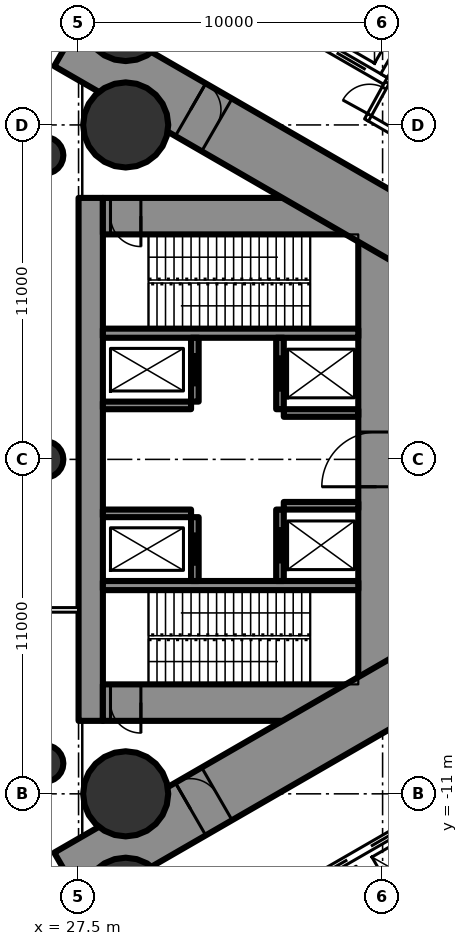
"""IFC4 building model, lengths in metres.
Left out: names, types, materials, properties, quantities, classifications, styles, units other than length and angle.
Written with IfcOpenShell. Run it as: python <this file> out.ifc"""

import sys

from ifc_helpers import new_model, si_unit, direction, frame, frame_2d, origin, origin_2d, place, context, subcontext, project, spatial, rectangle, circle, hollow_circle, extrude, element, fill, save


model = new_model("IFC4")
c1 = context("Model", 3, precision=1e-05, world=origin(), true_north=direction((0.0, 1.0)))
c2 = subcontext(c1, "Body", "Model", "MODEL_VIEW")
j1 = project(units=[si_unit("LENGTHUNIT", "METRE"), si_unit("PLANEANGLEUNIT", "RADIAN")], contexts=[c1])
p1 = place(None, origin())
s1 = spatial("IfcSite", under=j1, at=p1, CompositionType="ELEMENT")
p2 = place(p1, origin())
s2 = spatial("IfcBuilding", under=s1, at=p2, CompositionType="ELEMENT")
p3 = place(p2, origin())
s3 = spatial("IfcBuildingStorey", under=s2, at=p3, CompositionType="ELEMENT", Elevation=0.0)
for number, where, z_axis, x_axis in (
    (1, (29.05, 11.0, 0.0), (0.0, 0.0, 1.0), (1.0, 0.0, 0.0)),
    (2, (29.05, -11.0, 0.0), (0.0, 0.0, 1.0), (1.0, 0.0, 0.0)),
    (3, (29.05, -14.5, 0.0), (0.0, 0.0, 1.0), (1.0, 0.0, 0.0)),
    (4, (29.05, 14.5, 0.0), (0.0, 0.0, 1.0), (1.0, 0.0, 0.0)),
):
    element("IfcColumn", number, at=place(p3, frame(where, z_axis=z_axis, x_axis=x_axis)), inside=s3, PredefinedType="COLUMN", context=c2, shape_type="SweptSolid", body=[
        extrude(hollow_circle(Radius=1.4, WallThickness=0.12, at=origin_2d()), origin(), (0.0, 0.0, 1.0), 7.2),
    ])
p4 = place(p3, frame((27.9, -8.6, 0.0), z_axis=(0.0, 0.0, 1.0), x_axis=(0.0, 1.0, 0.0)))
e5 = element("IfcWall", 5, at=p4, inside=s3, PredefinedType="SHEAR", context=c2, shape_type="SweptSolid", body=[
    extrude(rectangle(XDim=17.2, YDim=0.8, at=frame_2d((8.6, 0.0))), origin(), (0.0, 0.0, 1.0), 7.2),
])
p5 = place(p3, frame((37.3, -8.6, 0.0), z_axis=(0.0, 0.0, 1.0), x_axis=(0.0, 1.0, 0.0)))
e6 = element("IfcWall", 6, at=p5, inside=s3, PredefinedType="SHEAR", context=c2, shape_type="SweptSolid", body=[
    extrude(rectangle(XDim=17.2, YDim=1.2, at=frame_2d((8.6, 0.0))), origin(), (0.0, 0.0, 1.0), 7.2),
])
p6 = place(p5, frame((7.7, 0.0, 0.0)))
e7 = element("IfcOpeningElement", 7, at=p6, cuts=e6, PredefinedType="OPENING", context=c2, shape_type="SweptSolid", body=[
    extrude(rectangle(XDim=1.8, YDim=2.2, at=frame_2d((0.9, 1.1))), frame((0.0, 0.61, 0.0), z_axis=(0.0, -1.0, 0.0), x_axis=(1.0, 0.0, 0.0)), (0.0, 0.0, 1.0), 1.22),
])
p7 = place(p3, frame((28.3, -8.0, 0.0), z_axis=(0.0, 0.0, 1.0), x_axis=(1.0, 0.0, 0.0)))
e8 = element("IfcWall", 8, at=p7, inside=s3, PredefinedType="SHEAR", context=c2, shape_type="SweptSolid", body=[
    extrude(rectangle(XDim=8.4, YDim=1.2, at=frame_2d((4.2, 0.0))), origin(), (0.0, 0.0, 1.0), 7.2),
])
p8 = place(p7, frame((0.25, 0.0, 0.0)))
e9 = element("IfcOpeningElement", 9, at=p8, cuts=e8, PredefinedType="OPENING", context=c2, shape_type="SweptSolid", body=[
    extrude(rectangle(XDim=1.0, YDim=2.2, at=frame_2d((0.5, 1.1))), frame((0.0, 0.61, 0.0), z_axis=(0.0, -1.0, 0.0), x_axis=(1.0, 0.0, 0.0)), (0.0, 0.0, 1.0), 1.22),
])
p9 = place(p3, frame((28.3, 8.0, 0.0), z_axis=(0.0, 0.0, 1.0), x_axis=(1.0, 0.0, 0.0)))
e10 = element("IfcWall", 10, at=p9, inside=s3, PredefinedType="SHEAR", context=c2, shape_type="SweptSolid", body=[
    extrude(rectangle(XDim=8.4, YDim=1.2, at=frame_2d((4.2, 0.0))), origin(), (0.0, 0.0, 1.0), 7.2),
])
p10 = place(p9, frame((0.25, 0.0, 0.0)))
e11 = element("IfcOpeningElement", 11, at=p10, cuts=e10, PredefinedType="OPENING", context=c2, shape_type="SweptSolid", body=[
    extrude(rectangle(XDim=1.0, YDim=2.2, at=frame_2d((0.5, 1.1))), frame((0.0, 0.61, 0.0), z_axis=(0.0, -1.0, 0.0), x_axis=(1.0, 0.0, 0.0)), (0.0, 0.0, 1.0), 1.22),
])
for number, where, z_axis, x_axis in (
    (12, (28.3, -4.15, 0.0), (0.0, 0.0, 1.0), (1.0, 0.0, 0.0)),
    (13, (28.3, 4.15, 0.0), (0.0, 0.0, 1.0), (1.0, 0.0, 0.0)),
):
    element("IfcWall", number, at=place(p3, frame(where, z_axis=z_axis, x_axis=x_axis)), inside=s3, PredefinedType="SHEAR", context=c2, shape_type="SweptSolid", body=[
        extrude(rectangle(XDim=8.4, YDim=0.3, at=frame_2d((4.2, 0.0))), origin(), (0.0, 0.0, 1.0), 7.2),
    ])
p11 = place(p3, frame((31.325, -4.0, 0.0), z_axis=(0.0, 0.0, 1.0), x_axis=(0.0, 1.0, 0.0)))
e14 = element("IfcWall", 14, at=p11, inside=s3, PredefinedType="SHEAR", context=c2, shape_type="SweptSolid", body=[
    extrude(rectangle(XDim=2.1, YDim=0.25, at=frame_2d((1.05, 0.0))), origin(), (0.0, 0.0, 1.0), 7.2),
])
p12 = place(p11, frame((0.5, 0.0, 0.0)))
e15 = element("IfcOpeningElement", 15, at=p12, cuts=e14, PredefinedType="OPENING", context=c2, shape_type="SweptSolid", body=[
    extrude(rectangle(XDim=1.1, YDim=2.2, at=frame_2d((0.55, 1.1))), frame((0.0, 0.135, 0.0), z_axis=(0.0, -1.0, 0.0), x_axis=(1.0, 0.0, 0.0)), (0.0, 0.0, 1.0), 0.27),
])
p13 = place(p3, frame((34.125, -4.0, 0.0), z_axis=(0.0, 0.0, 1.0), x_axis=(0.0, 1.0, 0.0)))
e16 = element("IfcWall", 16, at=p13, inside=s3, PredefinedType="SHEAR", context=c2, shape_type="SweptSolid", body=[
    extrude(rectangle(XDim=2.35, YDim=0.25, at=frame_2d((1.175, 0.0))), origin(), (0.0, 0.0, 1.0), 7.2),
])
p14 = place(p13, frame((0.575, 0.0, 0.0)))
e17 = element("IfcOpeningElement", 17, at=p14, cuts=e16, PredefinedType="OPENING", context=c2, shape_type="SweptSolid", body=[
    extrude(rectangle(XDim=1.2, YDim=2.2, at=frame_2d((0.6, 1.1))), frame((0.0, 0.135, 0.0), z_axis=(0.0, -1.0, 0.0), x_axis=(1.0, 0.0, 0.0)), (0.0, 0.0, 1.0), 0.27),
])
p15 = place(p3, frame((28.3, -1.775, 0.0), z_axis=(0.0, 0.0, 1.0), x_axis=(1.0, 0.0, 0.0)))
e18 = element("IfcWall", 18, at=p15, inside=s3, PredefinedType="SHEAR", context=c2, shape_type="SweptSolid", body=[
    extrude(rectangle(XDim=2.9, YDim=0.25, at=frame_2d((1.45, 0.0))), origin(), (0.0, 0.0, 1.0), 7.2),
])
p16 = place(p3, frame((34.25, -1.525, 0.0), z_axis=(0.0, 0.0, 1.0), x_axis=(1.0, 0.0, 0.0)))
e19 = element("IfcWall", 19, at=p16, inside=s3, PredefinedType="SHEAR", context=c2, shape_type="SweptSolid", body=[
    extrude(rectangle(XDim=2.45, YDim=0.25, at=frame_2d((1.225, 0.0))), origin(), (0.0, 0.0, 1.0), 7.2),
])
p17 = place(p3, frame((31.325, 1.9, 0.0), z_axis=(0.0, 0.0, 1.0), x_axis=(0.0, 1.0, 0.0)))
e20 = element("IfcWall", 20, at=p17, inside=s3, PredefinedType="SHEAR", context=c2, shape_type="SweptSolid", body=[
    extrude(rectangle(XDim=2.1, YDim=0.25, at=frame_2d((1.05, 0.0))), origin(), (0.0, 0.0, 1.0), 7.2),
])
p18 = place(p17, frame((0.5, 0.0, 0.0)))
e21 = element("IfcOpeningElement", 21, at=p18, cuts=e20, PredefinedType="OPENING", context=c2, shape_type="SweptSolid", body=[
    extrude(rectangle(XDim=1.1, YDim=2.2, at=frame_2d((0.55, 1.1))), frame((0.0, 0.135, 0.0), z_axis=(0.0, -1.0, 0.0), x_axis=(1.0, 0.0, 0.0)), (0.0, 0.0, 1.0), 0.27),
])
p19 = place(p3, frame((34.125, 1.65, 0.0), z_axis=(0.0, 0.0, 1.0), x_axis=(0.0, 1.0, 0.0)))
e22 = element("IfcWall", 22, at=p19, inside=s3, PredefinedType="SHEAR", context=c2, shape_type="SweptSolid", body=[
    extrude(rectangle(XDim=2.35, YDim=0.25, at=frame_2d((1.175, 0.0))), origin(), (0.0, 0.0, 1.0), 7.2),
])
p20 = place(p19, frame((0.575, 0.0, 0.0)))
e23 = element("IfcOpeningElement", 23, at=p20, cuts=e22, PredefinedType="OPENING", context=c2, shape_type="SweptSolid", body=[
    extrude(rectangle(XDim=1.2, YDim=2.2, at=frame_2d((0.6, 1.1))), frame((0.0, 0.135, 0.0), z_axis=(0.0, -1.0, 0.0), x_axis=(1.0, 0.0, 0.0)), (0.0, 0.0, 1.0), 0.27),
])
p21 = place(p3, frame((28.3, 1.775, 0.0), z_axis=(0.0, 0.0, 1.0), x_axis=(1.0, 0.0, 0.0)))
e24 = element("IfcWall", 24, at=p21, inside=s3, PredefinedType="SHEAR", context=c2, shape_type="SweptSolid", body=[
    extrude(rectangle(XDim=2.9, YDim=0.25, at=frame_2d((1.45, 0.0))), origin(), (0.0, 0.0, 1.0), 7.2),
])
p22 = place(p3, frame((34.25, 1.525, 0.0), z_axis=(0.0, 0.0, 1.0), x_axis=(1.0, 0.0, 0.0)))
e25 = element("IfcWall", 25, at=p22, inside=s3, PredefinedType="SHEAR", context=c2, shape_type="SweptSolid", body=[
    extrude(rectangle(XDim=2.45, YDim=0.25, at=frame_2d((1.225, 0.0))), origin(), (0.0, 0.0, 1.0), 7.2),
])
p23 = place(p3, frame((27.2, -13.8, 0.0), z_axis=(0.0, 0.0, 1.0), x_axis=(0.866027159892, 0.499996958321, 0.0)))
e26 = element("IfcWall", 26, at=p23, inside=s3, PredefinedType="SHEAR", context=c2, shape_type="SweptSolid", body=[
    extrude(rectangle(XDim=27.947, YDim=2.0, at=frame_2d((13.973, 0.0))), origin(), (0.0, 0.0, 1.0), 7.2),
])
p24 = place(p23, frame((4.6, 0.0, 0.0)))
e27 = element("IfcOpeningElement", 27, at=p24, cuts=e26, PredefinedType="OPENING", context=c2, shape_type="SweptSolid", body=[
    extrude(rectangle(XDim=1.0, YDim=2.2, at=frame_2d((0.5, 1.1))), frame((0.0, 1.01, 0.0), z_axis=(0.0, -1.0, 0.0), x_axis=(1.0, 0.0, 0.0)), (0.0, 0.0, 1.0), 2.02),
])
p25 = place(p23, frame((13.395, 0.0, 0.0)))
e28 = element("IfcOpeningElement", 28, at=p25, cuts=e26, PredefinedType="OPENING", context=c2, shape_type="SweptSolid", body=[
    extrude(rectangle(XDim=1.8, YDim=2.2, at=frame_2d((0.9, 1.1))), frame((0.0, 1.01, 0.0), z_axis=(0.0, -1.0, 0.0), x_axis=(1.0, 0.0, 0.0)), (0.0, 0.0, 1.0), 2.02),
])
p26 = place(p3, frame((27.2, 13.8, 0.0), z_axis=(0.0, 0.0, 1.0), x_axis=(0.866024545924, -0.500001485854, 0.0)))
e29 = element("IfcWall", 29, at=p26, inside=s3, PredefinedType="SHEAR", context=c2, shape_type="SweptSolid", body=[
    extrude(rectangle(XDim=26.534, YDim=2.0, at=frame_2d((13.267, 0.0))), origin(), (0.0, 0.0, 1.0), 7.2),
])
p27 = place(p26, frame((4.6, 0.0, 0.0)))
e30 = element("IfcOpeningElement", 30, at=p27, cuts=e29, PredefinedType="OPENING", context=c2, shape_type="SweptSolid", body=[
    extrude(rectangle(XDim=1.0, YDim=2.2, at=frame_2d((0.5, 1.1))), frame((0.0, 1.01, 0.0), z_axis=(0.0, -1.0, 0.0), x_axis=(1.0, 0.0, 0.0)), (0.0, 0.0, 1.0), 2.02),
])
p28 = place(p26, frame((13.395, 0.0, 0.0)))
e31 = element("IfcOpeningElement", 31, at=p28, cuts=e29, PredefinedType="OPENING", context=c2, shape_type="SweptSolid", body=[
    extrude(rectangle(XDim=1.8, YDim=2.2, at=frame_2d((0.9, 1.1))), frame((0.0, 1.01, 0.0), z_axis=(0.0, -1.0, 0.0), x_axis=(1.0, 0.0, 0.0)), (0.0, 0.0, 1.0), 2.02),
])
for number, where, z_axis, x_axis in (
    (32, (26.4, -10.0, 0.0), (0.0, 0.0, 1.0), (1.0, 0.0, 0.0)),
    (33, (26.4, 0.0, 0.0), (0.0, 0.0, 1.0), (1.0, 0.0, 0.0)),
    (34, (26.4, 10.0, 0.0), (0.0, 0.0, 1.0), (1.0, 0.0, 0.0)),
):
    element("IfcColumn", number, at=place(p3, frame(where, z_axis=z_axis, x_axis=x_axis)), inside=s3, PredefinedType="COLUMN", context=c2, shape_type="SweptSolid", body=[
        extrude(circle(Radius=0.6, at=origin_2d()), origin(), (0.0, 0.0, 1.0), 7.2),
    ])
p29 = place(p3, frame((37.034, 11.24, 0.0), z_axis=(0.0, 0.0, 1.0), x_axis=(0.866025942536, -0.499999066854, 0.0)))
e35 = element("IfcWall", 35, at=p29, inside=s3, PredefinedType="PARTITIONING", context=c2, shape_type="SweptSolid", body=[
    extrude(rectangle(XDim=22.36, YDim=0.2, at=frame_2d((11.18, 0.0))), origin(), (0.0, 0.0, 1.0), 6.85),
])
p30 = place(p29, frame((19.423, 0.0, 0.0)))
e36 = element("IfcOpeningElement", 36, at=p30, cuts=e35, PredefinedType="OPENING", context=c2, shape_type="SweptSolid", body=[
    extrude(rectangle(XDim=1.8, YDim=2.2, at=frame_2d((0.9, 1.1))), frame((0.0, 0.11, 0.0), z_axis=(0.0, -1.0, 0.0), x_axis=(1.0, 0.0, 0.0)), (0.0, 0.0, 1.0), 0.22),
])
p31 = place(p29, frame((13.174, 0.0, 0.0)))
e37 = element("IfcOpeningElement", 37, at=p31, cuts=e35, PredefinedType="OPENING", context=c2, shape_type="SweptSolid", body=[
    extrude(rectangle(XDim=2.0, YDim=2.4, at=frame_2d((1.0, 1.2))), frame((0.0, 0.11, 0.0), z_axis=(0.0, -1.0, 0.0), x_axis=(1.0, 0.0, 0.0)), (0.0, 0.0, 1.0), 0.22),
])
p32 = place(p29, frame((4.602, 0.0, 0.0)))
e38 = element("IfcOpeningElement", 38, at=p32, cuts=e35, PredefinedType="OPENING", context=c2, shape_type="SweptSolid", body=[
    extrude(rectangle(XDim=1.8, YDim=2.2, at=frame_2d((0.9, 1.1))), frame((0.0, 0.11, 0.0), z_axis=(0.0, -1.0, 0.0), x_axis=(1.0, 0.0, 0.0)), (0.0, 0.0, 1.0), 0.22),
])
p33 = place(p3, frame((36.971, 11.161, 0.0), z_axis=(0.0, 0.0, 1.0), x_axis=(0.481491794093, 0.876450598848, 0.0)))
e39 = element("IfcWall", 39, at=p33, inside=s3, PredefinedType="PARTITIONING", context=c2, shape_type="SweptSolid", body=[
    extrude(rectangle(XDim=1.405, YDim=0.15, at=frame_2d((0.703, 0.0))), origin(), (0.0, 0.0, 1.0), 6.85),
])
p34 = place(p33, frame((0.203, 0.0, 0.0)))
e40 = element("IfcOpeningElement", 40, at=p34, cuts=e39, PredefinedType="OPENING", context=c2, shape_type="SweptSolid", body=[
    extrude(rectangle(XDim=1.0, YDim=2.2, at=frame_2d((0.5, 1.1))), frame((0.0, 0.085, 0.0), z_axis=(0.0, -1.0, 0.0), x_axis=(1.0, 0.0, 0.0)), (0.0, 0.0, 1.0), 0.17),
])
p35 = place(p3, frame((4.625, -4.95, 0.0), z_axis=(0.0, 0.0, 1.0), x_axis=(1.0, 0.0, 0.0)))
e41 = element("IfcWall", 41, at=p35, inside=s3, PredefinedType="PARTITIONING", context=c2, shape_type="SweptSolid", body=[
    extrude(rectangle(XDim=22.875, YDim=0.15, at=frame_2d((11.438, 0.0))), origin(), (0.0, 0.0, 1.0), 5.85),
])
p36 = place(p35, frame((9.0, 0.0, 0.0)))
e42 = element("IfcOpeningElement", 42, at=p36, cuts=e41, PredefinedType="OPENING", context=c2, shape_type="SweptSolid", body=[
    extrude(rectangle(XDim=1.8, YDim=2.2, at=frame_2d((0.9, 1.1))), frame((0.0, 0.085, 0.0), z_axis=(0.0, -1.0, 0.0), x_axis=(1.0, 0.0, 0.0)), (0.0, 0.0, 1.0), 0.17),
])
p37 = place(p3, frame((31.271, -16.097, 0.0), z_axis=(0.0, 0.0, 1.0), x_axis=(0.86604045752, 0.499973925258, 0.0)))
e43 = element("IfcWall", 43, at=p37, inside=s3, PredefinedType="PARTITIONING", context=c2, shape_type="SweptSolid", body=[
    extrude(rectangle(XDim=8.6, YDim=0.25, at=frame_2d((4.3, 0.0))), origin(), (0.0, 0.0, 1.0), 6.85),
])
p38 = place(p37, frame((0.75, 0.0, 0.0)))
e44 = element("IfcOpeningElement", 44, at=p38, cuts=e43, PredefinedType="OPENING", context=c2, shape_type="SweptSolid", body=[
    extrude(rectangle(XDim=1.1, YDim=2.2, at=frame_2d((0.55, 1.1))), frame((0.0, 0.135, 0.0), z_axis=(0.0, -1.0, 0.0), x_axis=(1.0, 0.0, 0.0)), (0.0, 0.0, 1.0), 0.27),
])
p39 = place(p37, frame((2.75, 0.0, 0.0)))
e45 = element("IfcOpeningElement", 45, at=p39, cuts=e43, PredefinedType="OPENING", context=c2, shape_type="SweptSolid", body=[
    extrude(rectangle(XDim=1.1, YDim=2.2, at=frame_2d((0.55, 1.1))), frame((0.0, 0.135, 0.0), z_axis=(0.0, -1.0, 0.0), x_axis=(1.0, 0.0, 0.0)), (0.0, 0.0, 1.0), 0.27),
])
p40 = place(p37, frame((4.75, 0.0, 0.0)))
e46 = element("IfcOpeningElement", 46, at=p40, cuts=e43, PredefinedType="OPENING", context=c2, shape_type="SweptSolid", body=[
    extrude(rectangle(XDim=1.1, YDim=2.2, at=frame_2d((0.55, 1.1))), frame((0.0, 0.135, 0.0), z_axis=(0.0, -1.0, 0.0), x_axis=(1.0, 0.0, 0.0)), (0.0, 0.0, 1.0), 0.27),
])
p41 = place(p37, frame((6.75, 0.0, 0.0)))
e47 = element("IfcOpeningElement", 47, at=p41, cuts=e43, PredefinedType="OPENING", context=c2, shape_type="SweptSolid", body=[
    extrude(rectangle(XDim=1.1, YDim=2.2, at=frame_2d((0.55, 1.1))), frame((0.0, 0.135, 0.0), z_axis=(0.0, -1.0, 0.0), x_axis=(1.0, 0.0, 0.0)), (0.0, 0.0, 1.0), 0.27),
])
p42 = place(p3, frame((33.608, 14.747, 0.0), z_axis=(0.0, 0.0, 1.0), x_axis=(0.866043305498, -0.49996899204, 0.0)))
e48 = element("IfcWall", 48, at=p42, inside=s3, PredefinedType="PARTITIONING", context=c2, shape_type="SweptSolid", body=[
    extrude(rectangle(XDim=4.6, YDim=0.25, at=frame_2d((2.3, 0.0))), origin(), (0.0, 0.0, 1.0), 6.85),
])
p43 = place(p42, frame((0.75, 0.0, 0.0)))
e49 = element("IfcOpeningElement", 49, at=p43, cuts=e48, PredefinedType="OPENING", context=c2, shape_type="SweptSolid", body=[
    extrude(rectangle(XDim=1.1, YDim=2.2, at=frame_2d((0.55, 1.1))), frame((0.0, 0.135, 0.0), z_axis=(0.0, -1.0, 0.0), x_axis=(1.0, 0.0, 0.0)), (0.0, 0.0, 1.0), 0.27),
])
p44 = place(p42, frame((2.75, 0.0, 0.0)))
e50 = element("IfcOpeningElement", 50, at=p44, cuts=e48, PredefinedType="OPENING", context=c2, shape_type="SweptSolid", body=[
    extrude(rectangle(XDim=1.1, YDim=2.2, at=frame_2d((0.55, 1.1))), frame((0.0, 0.135, 0.0), z_axis=(0.0, -1.0, 0.0), x_axis=(1.0, 0.0, 0.0)), (0.0, 0.0, 1.0), 0.27),
])
p45 = place(p3, frame((37.547, 12.618, 0.0), z_axis=(0.0, 0.0, 1.0), x_axis=(0.499929347863, 0.866066190972, 0.0)))
e51 = element("IfcWall", 51, at=p45, inside=s3, PredefinedType="PARTITIONING", context=c2, shape_type="SweptSolid", body=[
    extrude(rectangle(XDim=3.201, YDim=0.25, at=frame_2d((1.6, 0.0))), origin(), (0.0, 0.0, 1.0), 6.85),
])
p46 = place(p34, origin())
e52 = element("IfcDoor", 52, at=p46, inside=s3, OperationType="SINGLE_SWING_LEFT", PredefinedType="DOOR", context=c2, shape_type="SweptSolid", body=[
    extrude(rectangle(XDim=1.0, YDim=2.2, at=frame_2d((0.5, 1.1))), frame((0.0, 0.025, 0.0), z_axis=(0.0, -1.0, 0.0), x_axis=(1.0, 0.0, 0.0)), (0.0, 0.0, 1.0), 0.05),
])
fill(e40, e52)
p47 = place(p24, origin())
e53 = element("IfcDoor", 53, at=p47, inside=s3, OperationType="SINGLE_SWING_LEFT", PredefinedType="DOOR", context=c2, shape_type="SweptSolid", body=[
    extrude(rectangle(XDim=1.0, YDim=2.2, at=frame_2d((0.5, 1.1))), frame((0.0, 0.025, 0.0), z_axis=(0.0, -1.0, 0.0), x_axis=(1.0, 0.0, 0.0)), (0.0, 0.0, 1.0), 0.05),
])
fill(e27, e53)
p48 = place(p27, origin())
e54 = element("IfcDoor", 54, at=p48, inside=s3, OperationType="SINGLE_SWING_LEFT", PredefinedType="DOOR", context=c2, shape_type="SweptSolid", body=[
    extrude(rectangle(XDim=1.0, YDim=2.2, at=frame_2d((0.5, 1.1))), frame((0.0, 0.025, 0.0), z_axis=(0.0, -1.0, 0.0), x_axis=(1.0, 0.0, 0.0)), (0.0, 0.0, 1.0), 0.05),
])
fill(e30, e54)
p49 = place(p6, origin())
e55 = element("IfcDoor", 55, at=p49, inside=s3, OperationType="DOUBLE_DOOR_SINGLE_SWING", PredefinedType="DOOR", context=c2, shape_type="SweptSolid", body=[
    extrude(rectangle(XDim=1.8, YDim=2.2, at=frame_2d((0.9, 1.1))), frame((0.0, 0.025, 0.0), z_axis=(0.0, -1.0, 0.0), x_axis=(1.0, 0.0, 0.0)), (0.0, 0.0, 1.0), 0.05),
])
fill(e7, e55)
p50 = place(p8, origin())
e56 = element("IfcDoor", 56, at=p50, inside=s3, OperationType="SINGLE_SWING_RIGHT", PredefinedType="DOOR", context=c2, shape_type="SweptSolid", body=[
    extrude(rectangle(XDim=1.0, YDim=2.2, at=frame_2d((0.5, 1.1))), frame((0.0, 0.025, 0.0), z_axis=(0.0, -1.0, 0.0), x_axis=(1.0, 0.0, 0.0)), (0.0, 0.0, 1.0), 0.05),
])
fill(e9, e56)
p51 = place(p10, origin())
e57 = element("IfcDoor", 57, at=p51, inside=s3, OperationType="SINGLE_SWING_RIGHT", PredefinedType="DOOR", context=c2, shape_type="SweptSolid", body=[
    extrude(rectangle(XDim=1.0, YDim=2.2, at=frame_2d((0.5, 1.1))), frame((0.0, 0.025, 0.0), z_axis=(0.0, -1.0, 0.0), x_axis=(1.0, 0.0, 0.0)), (0.0, 0.0, 1.0), 0.05),
])
fill(e11, e57)
p52 = place(p12, origin())
e58 = element("IfcDoor", 58, at=p52, inside=s3, OperationType="SLIDING_TO_LEFT", PredefinedType="USERDEFINED", context=c2, shape_type="SweptSolid", body=[
    extrude(rectangle(XDim=1.1, YDim=2.2, at=frame_2d((0.55, 1.1))), frame((0.0, 0.025, 0.0), z_axis=(0.0, -1.0, 0.0), x_axis=(1.0, 0.0, 0.0)), (0.0, 0.0, 1.0), 0.05),
])
fill(e15, e58)
p53 = place(p18, origin())
e59 = element("IfcDoor", 59, at=p53, inside=s3, OperationType="SLIDING_TO_LEFT", PredefinedType="USERDEFINED", context=c2, shape_type="SweptSolid", body=[
    extrude(rectangle(XDim=1.1, YDim=2.2, at=frame_2d((0.55, 1.1))), frame((0.0, 0.025, 0.0), z_axis=(0.0, -1.0, 0.0), x_axis=(1.0, 0.0, 0.0)), (0.0, 0.0, 1.0), 0.05),
])
fill(e21, e59)
p54 = place(p14, origin())
e60 = element("IfcDoor", 60, at=p54, inside=s3, OperationType="DOUBLE_DOOR_SLIDING", PredefinedType="USERDEFINED", context=c2, shape_type="SweptSolid", body=[
    extrude(rectangle(XDim=1.2, YDim=2.2, at=frame_2d((0.6, 1.1))), frame((0.0, 0.025, 0.0), z_axis=(0.0, -1.0, 0.0), x_axis=(1.0, 0.0, 0.0)), (0.0, 0.0, 1.0), 0.05),
])
fill(e17, e60)
p55 = place(p20, origin())
e61 = element("IfcDoor", 61, at=p55, inside=s3, OperationType="DOUBLE_DOOR_SLIDING", PredefinedType="USERDEFINED", context=c2, shape_type="SweptSolid", body=[
    extrude(rectangle(XDim=1.2, YDim=2.2, at=frame_2d((0.6, 1.1))), frame((0.0, 0.025, 0.0), z_axis=(0.0, -1.0, 0.0), x_axis=(1.0, 0.0, 0.0)), (0.0, 0.0, 1.0), 0.05),
])
fill(e23, e61)
p56 = place(p40, origin())
e62 = element("IfcDoor", 62, at=p56, inside=s3, OperationType="DOUBLE_DOOR_SLIDING", PredefinedType="USERDEFINED", context=c2, shape_type="SweptSolid", body=[
    extrude(rectangle(XDim=1.1, YDim=2.2, at=frame_2d((0.55, 1.1))), frame((0.0, 0.025, 0.0), z_axis=(0.0, -1.0, 0.0), x_axis=(1.0, 0.0, 0.0)), (0.0, 0.0, 1.0), 0.05),
])
fill(e46, e62)
p57 = place(p41, origin())
e63 = element("IfcDoor", 63, at=p57, inside=s3, OperationType="DOUBLE_DOOR_SLIDING", PredefinedType="USERDEFINED", context=c2, shape_type="SweptSolid", body=[
    extrude(rectangle(XDim=1.1, YDim=2.2, at=frame_2d((0.55, 1.1))), frame((0.0, 0.025, 0.0), z_axis=(0.0, -1.0, 0.0), x_axis=(1.0, 0.0, 0.0)), (0.0, 0.0, 1.0), 0.05),
])
fill(e47, e63)
p58 = place(p44, origin())
e64 = element("IfcDoor", 64, at=p58, inside=s3, OperationType="DOUBLE_DOOR_SLIDING", PredefinedType="USERDEFINED", context=c2, shape_type="SweptSolid", body=[
    extrude(rectangle(XDim=1.1, YDim=2.2, at=frame_2d((0.55, 1.1))), frame((0.0, 0.025, 0.0), z_axis=(0.0, -1.0, 0.0), x_axis=(1.0, 0.0, 0.0)), (0.0, 0.0, 1.0), 0.05),
])
fill(e50, e64)
save(model, sys.argv[1])
